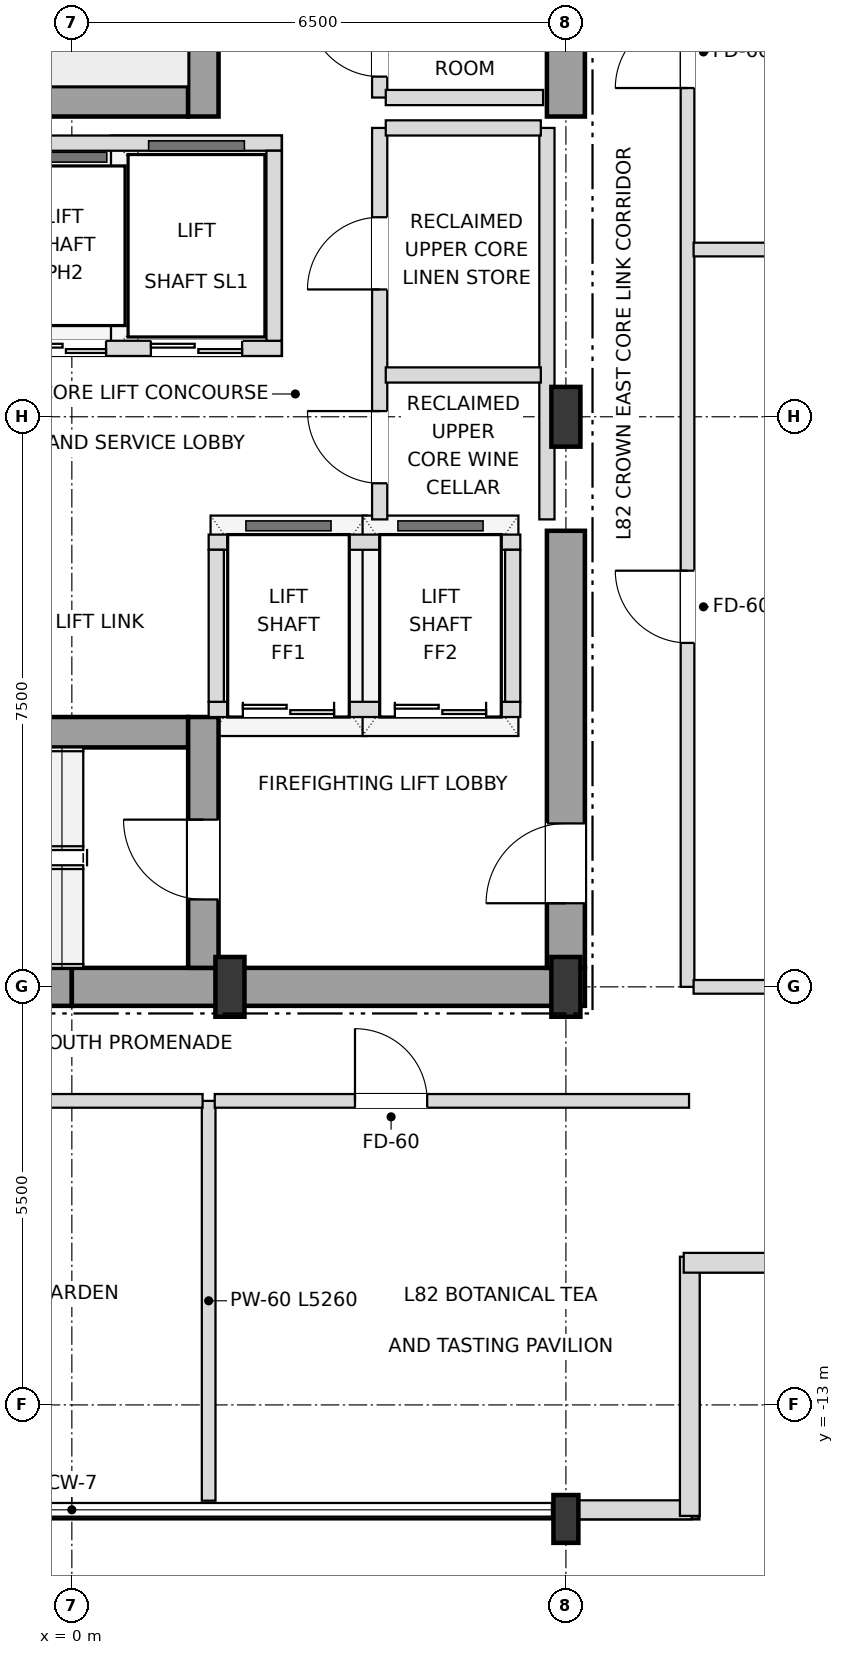
"""IFC4 building model, lengths in metres.
Left out: names, types, materials, properties, quantities, classifications, styles, units other than length and angle.
Written with IfcOpenShell. Run it as: python <this file> out.ifc"""

import sys

from ifc_helpers import new_model, si_unit, direction, frame, frame_2d, origin, origin_2d, place, context, subcontext, project, spatial, rectangle, i_section, extrude, element, fill, save


model = new_model("IFC4")
c1 = context("Model", 3, precision=1e-05, world=origin(), true_north=direction((0.0, 1.0)))
c2 = subcontext(c1, "Body", "Model", "MODEL_VIEW")
j1 = project(units=[si_unit("LENGTHUNIT", "METRE"), si_unit("PLANEANGLEUNIT", "RADIAN")], contexts=[c1])
p1 = place(None, origin())
s1 = spatial("IfcSite", under=j1, at=p1, CompositionType="ELEMENT")
p2 = place(p1, origin())
s2 = spatial("IfcBuilding", under=s1, at=p2, CompositionType="ELEMENT")
p3 = place(p2, frame((0.0, 0.0, 314.4)))
s3 = spatial("IfcBuildingStorey", under=s2, at=p3, CompositionType="ELEMENT", Elevation=314.4)
for number, where, z_axis, x_axis in (
    (1, (2.08, -7.5, 0.0), (0.0, 0.0, 1.0), (1.0, 0.0, 0.0)),
    (2, (6.5, -7.5, 0.0), (0.0, 0.0, 1.0), (1.0, 0.0, 0.0)),
    (3, (6.5, 0.0, 0.0), (0.0, 0.0, 1.0), (1.0, 0.0, 0.0)),
):
    element("IfcColumn", number, at=place(p3, frame(where, z_axis=z_axis, x_axis=x_axis)), inside=s3, PredefinedType="COLUMN", context=c2, shape_type="SweptSolid", body=[
        extrude(i_section(OverallWidth=0.382, OverallDepth=0.786, WebThickness=0.02, FlangeThickness=0.033, at=origin_2d()), origin(), (0.0, 0.0, 1.0), 4.5),
    ])
p4 = place(p3, frame((6.5, -14.5, 0.0), z_axis=(0.0, 0.0, 1.0), x_axis=(1.0, 0.0, 0.0)))
e4 = element("IfcColumn", 4, at=p4, inside=s3, PredefinedType="COLUMN", context=c2, shape_type="SweptSolid", body=[
    extrude(i_section(OverallWidth=0.328, OverallDepth=0.629, WebThickness=0.014, FlangeThickness=0.021, at=origin_2d()), origin(), (0.0, 0.0, 1.0), 4.5),
])
p5 = place(p3, frame((6.659, -14.38, 0.0), z_axis=(0.0, 0.0, 1.0), x_axis=(1.0, 0.0, 0.0)))
e5 = element("IfcWall", 5, at=p5, inside=s3, PredefinedType="SOLIDWALL", context=c2, shape_type="SweptSolid", body=[
    extrude(rectangle(XDim=1.496, YDim=0.25, at=frame_2d((0.748, 0.0))), origin(), (0.0, 0.0, 1.0), 4.25),
])
for number, where, z_axis, x_axis in (
    (6, (8.13, -14.46, 0.0), (0.0, 0.0, 1.0), (0.0, 1.0, 0.0)),
    (7, (8.05, -11.13, 0.0), (0.0, 0.0, 1.0), (1.0, 0.0, 0.0)),
):
    element("IfcWall", number, at=place(p3, frame(where, z_axis=z_axis, x_axis=x_axis)), inside=s3, PredefinedType="SOLIDWALL", context=c2, shape_type="SweptSolid", body=[
        extrude(rectangle(XDim=3.41, YDim=0.26, at=frame_2d((1.705, 0.0))), origin(), (0.0, 0.0, 1.0), 4.25),
    ])
for number, where, z_axis, x_axis in (
    (8, (-6.75, -7.5, 0.0), (0.0, 0.0, 1.0), (1.0, 0.0, 0.0)),
    (9, (0.0, -7.5, 0.0), (0.0, 0.0, 1.0), (1.0, 0.0, 0.0)),
):
    element("IfcWall", number, at=place(p3, frame(where, z_axis=z_axis, x_axis=x_axis)), inside=s3, PredefinedType="SHEAR", context=c2, shape_type="SweptSolid", body=[
        extrude(rectangle(XDim=6.75, YDim=0.5, at=frame_2d((3.375, 0.0))), origin(), (0.0, 0.0, 1.0), 4.25),
    ])
p6 = place(p3, frame((6.5, -7.25, 0.0), z_axis=(0.0, 0.0, 1.0), x_axis=(0.0, 1.0, 0.0)))
e10 = element("IfcWall", 10, at=p6, inside=s3, PredefinedType="SHEAR", context=c2, shape_type="SweptSolid", body=[
    extrude(rectangle(XDim=5.75, YDim=0.5, at=frame_2d((2.875, 0.0))), origin(), (0.0, 0.0, 1.0), 4.25),
])
p7 = place(p6, frame((0.85, 0.0, 0.0)))
e11 = element("IfcOpeningElement", 11, at=p7, cuts=e10, PredefinedType="OPENING", context=c2, shape_type="SweptSolid", body=[
    extrude(rectangle(XDim=1.05, YDim=2.15, at=frame_2d((0.525, 1.075))), frame((0.0, 0.26, 0.0), z_axis=(0.0, -1.0, 0.0), x_axis=(1.0, 0.0, 0.0)), (0.0, 0.0, 1.0), 0.52),
])
p8 = place(p3, frame((6.5, 3.95, 0.0), z_axis=(0.0, 0.0, 1.0), x_axis=(0.0, 1.0, 0.0)))
e12 = element("IfcWall", 12, at=p8, inside=s3, PredefinedType="SHEAR", context=c2, shape_type="SweptSolid", body=[
    extrude(rectangle(XDim=3.3, YDim=0.5, at=frame_2d((1.65, 0.0))), origin(), (0.0, 0.0, 1.0), 4.25),
])
p9 = place(p3, frame((-6.25, -4.15, 0.0), z_axis=(0.0, 0.0, 1.0), x_axis=(1.0, 0.0, 0.0)))
e13 = element("IfcWall", 13, at=p9, inside=s3, PredefinedType="SHEAR", context=c2, shape_type="SweptSolid", body=[
    extrude(rectangle(XDim=7.78, YDim=0.4, at=frame_2d((3.89, 0.0))), origin(), (0.0, 0.0, 1.0), 4.25),
])
p10 = place(p3, frame((1.73, -7.25, 0.0), z_axis=(0.0, 0.0, 1.0), x_axis=(0.0, 1.0, 0.0)))
e14 = element("IfcWall", 14, at=p10, inside=s3, PredefinedType="SHEAR", context=c2, shape_type="SweptSolid", body=[
    extrude(rectangle(XDim=3.3, YDim=0.4, at=frame_2d((1.65, 0.0))), origin(), (0.0, 0.0, 1.0), 4.25),
])
p11 = place(p10, frame((0.9, 0.0, 0.0)))
e15 = element("IfcOpeningElement", 15, at=p11, cuts=e14, PredefinedType="OPENING", context=c2, shape_type="SweptSolid", body=[
    extrude(rectangle(XDim=1.05, YDim=2.15, at=frame_2d((0.525, 1.075))), frame((0.0, 0.21, 0.0), z_axis=(0.0, -1.0, 0.0), x_axis=(1.0, 0.0, 0.0)), (0.0, 0.0, 1.0), 0.42),
])
p12 = place(p3, frame((-5.55, 4.15, 0.0), z_axis=(0.0, 0.0, 1.0), x_axis=(1.0, 0.0, 0.0)))
e16 = element("IfcWall", 16, at=p12, inside=s3, PredefinedType="SHEAR", context=c2, shape_type="SweptSolid", body=[
    extrude(rectangle(XDim=7.08, YDim=0.4, at=frame_2d((3.54, 0.0))), origin(), (0.0, 0.0, 1.0), 4.25),
])
p13 = place(p3, frame((1.73, 3.95, 0.0), z_axis=(0.0, 0.0, 1.0), x_axis=(0.0, 1.0, 0.0)))
e17 = element("IfcWall", 17, at=p13, inside=s3, PredefinedType="SHEAR", context=c2, shape_type="SweptSolid", body=[
    extrude(rectangle(XDim=3.3, YDim=0.4, at=frame_2d((1.65, 0.0))), origin(), (0.0, 0.0, 1.0), 4.25),
])
p14 = place(p3, frame((-2.82, 0.9, 0.0), z_axis=(0.0, 0.0, 1.0), x_axis=(1.0, 0.0, 0.0)))
e18 = element("IfcWall", 18, at=p14, inside=s3, PredefinedType="SOLIDWALL", context=c2, shape_type="SweptSolid", body=[
    extrude(rectangle(XDim=5.58, YDim=0.2, at=frame_2d((2.79, 0.0))), origin(), (0.0, 0.0, 1.0), 4.25),
])
p15 = place(p14, frame((0.49, 0.0, 0.0)))
e19 = element("IfcOpeningElement", 19, at=p15, cuts=e18, PredefinedType="OPENING", context=c2, shape_type="SweptSolid", body=[
    extrude(rectangle(XDim=1.1, YDim=2.15, at=frame_2d((0.55, 1.075))), frame((0.0, 0.11, 0.0), z_axis=(0.0, -1.0, 0.0), x_axis=(1.0, 0.0, 0.0)), (0.0, 0.0, 1.0), 0.22),
])
p16 = place(p14, frame((2.17, 0.0, 0.0)))
e20 = element("IfcOpeningElement", 20, at=p16, cuts=e18, PredefinedType="OPENING", context=c2, shape_type="SweptSolid", body=[
    extrude(rectangle(XDim=1.1, YDim=2.15, at=frame_2d((0.55, 1.075))), frame((0.0, 0.11, 0.0), z_axis=(0.0, -1.0, 0.0), x_axis=(1.0, 0.0, 0.0)), (0.0, 0.0, 1.0), 0.22),
])
p17 = place(p14, frame((3.86, 0.0, 0.0)))
e21 = element("IfcOpeningElement", 21, at=p17, cuts=e18, PredefinedType="OPENING", context=c2, shape_type="SweptSolid", body=[
    extrude(rectangle(XDim=1.2, YDim=2.2, at=frame_2d((0.6, 1.1))), frame((0.0, 0.11, 0.0), z_axis=(0.0, -1.0, 0.0), x_axis=(1.0, 0.0, 0.0)), (0.0, 0.0, 1.0), 0.22),
])
p18 = place(p3, frame((-2.82, 3.6, 0.0), z_axis=(0.0, 0.0, 1.0), x_axis=(1.0, 0.0, 0.0)))
e22 = element("IfcWall", 22, at=p18, inside=s3, PredefinedType="SOLIDWALL", context=c2, shape_type="SweptSolid", body=[
    extrude(rectangle(XDim=5.58, YDim=0.2, at=frame_2d((2.79, 0.0))), origin(), (0.0, 0.0, 1.0), 4.25),
])
p19 = place(p3, frame((2.66, 1.0, 0.0), z_axis=(0.0, 0.0, 1.0), x_axis=(0.0, 1.0, 0.0)))
e23 = element("IfcWall", 23, at=p19, inside=s3, PredefinedType="SOLIDWALL", context=c2, shape_type="SweptSolid", body=[
    extrude(rectangle(XDim=2.5, YDim=0.2, at=frame_2d((1.25, 0.0))), origin(), (0.0, 0.0, 1.0), 4.25),
])
p20 = place(p3, frame((1.8, -3.85, 0.0), z_axis=(0.0, 0.0, 1.0), x_axis=(1.0, 0.0, 0.0)))
e24 = element("IfcWall", 24, at=p20, inside=s3, PredefinedType="SOLIDWALL", context=c2, shape_type="SweptSolid", body=[
    extrude(rectangle(XDim=4.1, YDim=0.2, at=frame_2d((2.05, 0.0))), origin(), (0.0, 0.0, 1.0), 4.25),
])
p21 = place(p20, frame((0.45, 0.0, 0.0)))
e25 = element("IfcOpeningElement", 25, at=p21, cuts=e24, PredefinedType="OPENING", context=c2, shape_type="SweptSolid", body=[
    extrude(rectangle(XDim=1.2, YDim=2.2, at=frame_2d((0.6, 1.1))), frame((0.0, 0.11, 0.0), z_axis=(0.0, -1.0, 0.0), x_axis=(1.0, 0.0, 0.0)), (0.0, 0.0, 1.0), 0.22),
])
p22 = place(p20, frame((2.45, 0.0, 0.0)))
e26 = element("IfcOpeningElement", 26, at=p22, cuts=e24, PredefinedType="OPENING", context=c2, shape_type="SweptSolid", body=[
    extrude(rectangle(XDim=1.2, YDim=2.2, at=frame_2d((0.6, 1.1))), frame((0.0, 0.11, 0.0), z_axis=(0.0, -1.0, 0.0), x_axis=(1.0, 0.0, 0.0)), (0.0, 0.0, 1.0), 0.22),
])
p23 = place(p3, frame((1.8, -1.65, 0.0), z_axis=(0.0, 0.0, 1.0), x_axis=(1.0, 0.0, 0.0)))
e27 = element("IfcWall", 27, at=p23, inside=s3, PredefinedType="SOLIDWALL", context=c2, shape_type="SweptSolid", body=[
    extrude(rectangle(XDim=4.1, YDim=0.2, at=frame_2d((2.05, 0.0))), origin(), (0.0, 0.0, 1.0), 4.25),
])
for number, where, z_axis, x_axis in (
    (28, (1.9, -3.75, 0.0), (0.0, 0.0, 1.0), (0.0, 1.0, 0.0)),
    (29, (5.8, -3.75, 0.0), (0.0, 0.0, 1.0), (0.0, 1.0, 0.0)),
):
    element("IfcWall", number, at=place(p3, frame(where, z_axis=z_axis, x_axis=x_axis)), inside=s3, PredefinedType="SOLIDWALL", context=c2, shape_type="SweptSolid", body=[
        extrude(rectangle(XDim=2.0, YDim=0.2, at=frame_2d((1.0, 0.0))), origin(), (0.0, 0.0, 1.0), 4.25),
    ])
p24 = place(p3, frame((1.8, -14.26, 0.0), z_axis=(0.0, 0.0, 1.0), x_axis=(0.0, 1.0, 0.0)))
e30 = element("IfcWall", 30, at=p24, inside=s3, PredefinedType="PARTITIONING", context=c2, shape_type="SweptSolid", body=[
    extrude(rectangle(XDim=5.26, YDim=0.18, at=frame_2d((2.63, 0.0))), origin(), (0.0, 0.0, 1.0), 4.25),
])
p25 = place(p3, frame((4.05, -1.35, 0.0), z_axis=(0.0, 0.0, 1.0), x_axis=(0.0, 1.0, 0.0)))
e31 = element("IfcWall", 31, at=p25, inside=s3, PredefinedType="SOLIDWALL", context=c2, shape_type="SweptSolid", body=[
    extrude(rectangle(XDim=5.15, YDim=0.2, at=frame_2d((2.575, 0.0))), origin(), (0.0, 0.0, 1.0), 4.25),
])
p26 = place(p25, frame((0.475, 0.0, 0.0)))
e32 = element("IfcOpeningElement", 32, at=p26, cuts=e31, PredefinedType="OPENING", context=c2, shape_type="SweptSolid", body=[
    extrude(rectangle(XDim=0.95, YDim=2.15, at=frame_2d((0.475, 1.075))), frame((0.0, 0.11, 0.0), z_axis=(0.0, -1.0, 0.0), x_axis=(1.0, 0.0, 0.0)), (0.0, 0.0, 1.0), 0.22),
])
p27 = place(p25, frame((3.025, 0.0, 0.0)))
e33 = element("IfcOpeningElement", 33, at=p27, cuts=e31, PredefinedType="OPENING", context=c2, shape_type="SweptSolid", body=[
    extrude(rectangle(XDim=0.95, YDim=2.15, at=frame_2d((0.475, 1.075))), frame((0.0, 0.11, 0.0), z_axis=(0.0, -1.0, 0.0), x_axis=(1.0, 0.0, 0.0)), (0.0, 0.0, 1.0), 0.22),
])
p28 = place(p3, frame((4.05, 4.2, 0.0), z_axis=(0.0, 0.0, 1.0), x_axis=(0.0, 1.0, 0.0)))
e34 = element("IfcWall", 34, at=p28, inside=s3, PredefinedType="SOLIDWALL", context=c2, shape_type="SweptSolid", body=[
    extrude(rectangle(XDim=3.05, YDim=0.2, at=frame_2d((1.525, 0.0))), origin(), (0.0, 0.0, 1.0), 4.25),
])
p29 = place(p28, frame((0.275, 0.0, 0.0)))
e35 = element("IfcOpeningElement", 35, at=p29, cuts=e34, PredefinedType="OPENING", context=c2, shape_type="SweptSolid", body=[
    extrude(rectangle(XDim=0.95, YDim=2.15, at=frame_2d((0.475, 1.075))), frame((0.0, 0.11, 0.0), z_axis=(0.0, -1.0, 0.0), x_axis=(1.0, 0.0, 0.0)), (0.0, 0.0, 1.0), 0.22),
])
p30 = place(p28, frame((1.775, 0.0, 0.0)))
e36 = element("IfcOpeningElement", 36, at=p30, cuts=e34, PredefinedType="OPENING", context=c2, shape_type="SweptSolid", body=[
    extrude(rectangle(XDim=0.95, YDim=2.15, at=frame_2d((0.475, 1.075))), frame((0.0, 0.11, 0.0), z_axis=(0.0, -1.0, 0.0), x_axis=(1.0, 0.0, 0.0)), (0.0, 0.0, 1.0), 0.22),
])
p31 = place(p3, frame((6.25, -1.35, 0.0), z_axis=(0.0, 0.0, 1.0), x_axis=(0.0, 1.0, 0.0)))
e37 = element("IfcWall", 37, at=p31, inside=s3, PredefinedType="SOLIDWALL", context=c2, shape_type="SweptSolid", body=[
    extrude(rectangle(XDim=5.15, YDim=0.2, at=frame_2d((2.575, 0.0))), origin(), (0.0, 0.0, 1.0), 4.25),
])
p32 = place(p3, frame((8.1, -7.5, 0.0), z_axis=(0.0, 0.0, 1.0), x_axis=(0.0, 1.0, 0.0)))
e38 = element("IfcWall", 38, at=p32, inside=s3, PredefinedType="PARTITIONING", context=c2, shape_type="SweptSolid", body=[
    extrude(rectangle(XDim=15.0, YDim=0.18, at=frame_2d((7.5, 0.0))), origin(), (0.0, 0.0, 1.0), 4.25),
])
p33 = place(p32, frame((4.525, 0.0, 0.0)))
e39 = element("IfcOpeningElement", 39, at=p33, cuts=e38, PredefinedType="OPENING", context=c2, shape_type="SweptSolid", body=[
    extrude(rectangle(XDim=0.95, YDim=2.15, at=frame_2d((0.475, 1.075))), frame((0.0, 0.1, 0.0), z_axis=(0.0, -1.0, 0.0), x_axis=(1.0, 0.0, 0.0)), (0.0, 0.0, 1.0), 0.2),
])
p34 = place(p32, frame((11.825, 0.0, 0.0)))
e40 = element("IfcOpeningElement", 40, at=p34, cuts=e38, PredefinedType="OPENING", context=c2, shape_type="SweptSolid", body=[
    extrude(rectangle(XDim=0.95, YDim=2.15, at=frame_2d((0.475, 1.075))), frame((0.0, 0.1, 0.0), z_axis=(0.0, -1.0, 0.0), x_axis=(1.0, 0.0, 0.0)), (0.0, 0.0, 1.0), 0.2),
])
p35 = place(p3, frame((-8.12, -9.0, 0.0), z_axis=(0.0, 0.0, 1.0), x_axis=(1.0, 0.0, 0.0)))
e41 = element("IfcWall", 41, at=p35, inside=s3, PredefinedType="PARTITIONING", context=c2, shape_type="SweptSolid", body=[
    extrude(rectangle(XDim=9.84, YDim=0.18, at=frame_2d((4.92, 0.0))), origin(), (0.0, 0.0, 1.0), 4.25),
])
p36 = place(p35, frame((3.445, 0.0, 0.0)))
e42 = element("IfcOpeningElement", 42, at=p36, cuts=e41, PredefinedType="OPENING", context=c2, shape_type="SweptSolid", body=[
    extrude(rectangle(XDim=0.95, YDim=2.15, at=frame_2d((0.475, 1.075))), frame((0.0, 0.1, 0.0), z_axis=(0.0, -1.0, 0.0), x_axis=(1.0, 0.0, 0.0)), (0.0, 0.0, 1.0), 0.2),
])
p37 = place(p3, frame((1.88, -9.0, 0.0), z_axis=(0.0, 0.0, 1.0), x_axis=(1.0, 0.0, 0.0)))
e43 = element("IfcWall", 43, at=p37, inside=s3, PredefinedType="PARTITIONING", context=c2, shape_type="SweptSolid", body=[
    extrude(rectangle(XDim=6.24, YDim=0.18, at=frame_2d((3.12, 0.0))), origin(), (0.0, 0.0, 1.0), 4.25),
])
p38 = place(p37, frame((1.845, 0.0, 0.0)))
e44 = element("IfcOpeningElement", 44, at=p38, cuts=e43, PredefinedType="OPENING", context=c2, shape_type="SweptSolid", body=[
    extrude(rectangle(XDim=0.95, YDim=2.15, at=frame_2d((0.475, 1.075))), frame((0.0, 0.1, 0.0), z_axis=(0.0, -1.0, 0.0), x_axis=(1.0, 0.0, 0.0)), (0.0, 0.0, 1.0), 0.2),
])
p39 = place(p3, frame((8.18, -7.5, 0.0), z_axis=(0.0, 0.0, 1.0), x_axis=(1.0, 0.0, 0.0)))
e45 = element("IfcWall", 45, at=p39, inside=s3, PredefinedType="PARTITIONING", context=c2, shape_type="SweptSolid", body=[
    extrude(rectangle(XDim=3.065, YDim=0.18, at=frame_2d((1.533, 0.0))), origin(), (0.0, 0.0, 1.0), 3.918),
])
p40 = place(p3, frame((4.13, 0.55, 0.0), z_axis=(0.0, 0.0, 1.0), x_axis=(1.0, 0.0, 0.0)))
e46 = element("IfcWall", 46, at=p40, inside=s3, PredefinedType="SOLIDWALL", context=c2, shape_type="SweptSolid", body=[
    extrude(rectangle(XDim=2.04, YDim=0.2, at=frame_2d((1.02, 0.0))), origin(), (0.0, 0.0, 1.0), 4.25),
])
p41 = place(p3, frame((8.18, 2.2, 0.0), z_axis=(0.0, 0.0, 1.0), x_axis=(1.0, 0.0, 0.0)))
e47 = element("IfcWall", 47, at=p41, inside=s3, PredefinedType="PARTITIONING", context=c2, shape_type="SweptSolid", body=[
    extrude(rectangle(XDim=3.065, YDim=0.18, at=frame_2d((1.533, 0.0))), origin(), (0.0, 0.0, 1.0), 4.25),
])
p42 = place(p3, frame((4.13, 3.8, 0.0), z_axis=(0.0, 0.0, 1.0), x_axis=(1.0, 0.0, 0.0)))
e48 = element("IfcWall", 48, at=p42, inside=s3, PredefinedType="SOLIDWALL", context=c2, shape_type="SweptSolid", body=[
    extrude(rectangle(XDim=2.04, YDim=0.2, at=frame_2d((1.02, 0.0))), origin(), (0.0, 0.0, 1.0), 4.25),
])
p43 = place(p3, frame((4.13, 4.2, 0.0), z_axis=(0.0, 0.0, 1.0), x_axis=(1.0, 0.0, 0.0)))
e49 = element("IfcWall", 49, at=p43, inside=s3, PredefinedType="SOLIDWALL", context=c2, shape_type="SweptSolid", body=[
    extrude(rectangle(XDim=2.07, YDim=0.2, at=frame_2d((1.035, 0.0))), origin(), (0.0, 0.0, 1.0), 4.25),
])
p44 = place(p7, origin())
e50 = element("IfcDoor", 50, at=p44, inside=s3, OperationType="SINGLE_SWING_LEFT", PredefinedType="DOOR", context=c2, shape_type="SweptSolid", body=[
    extrude(rectangle(XDim=1.05, YDim=2.15, at=frame_2d((0.525, 1.075))), frame((0.0, 0.025, 0.0), z_axis=(0.0, -1.0, 0.0), x_axis=(1.0, 0.0, 0.0)), (0.0, 0.0, 1.0), 0.05),
])
fill(e11, e50)
p45 = place(p11, origin())
e51 = element("IfcDoor", 51, at=p45, inside=s3, OperationType="SINGLE_SWING_RIGHT", PredefinedType="DOOR", context=c2, shape_type="SweptSolid", body=[
    extrude(rectangle(XDim=1.05, YDim=2.15, at=frame_2d((0.525, 1.075))), frame((0.0, 0.025, 0.0), z_axis=(0.0, -1.0, 0.0), x_axis=(1.0, 0.0, 0.0)), (0.0, 0.0, 1.0), 0.05),
])
fill(e15, e51)
p46 = place(p16, origin())
e52 = element("IfcDoor", 52, at=p46, inside=s3, OperationType="DOUBLE_DOOR_SLIDING", PredefinedType="DOOR", context=c2, shape_type="SweptSolid", body=[
    extrude(rectangle(XDim=1.1, YDim=2.15, at=frame_2d((0.55, 1.075))), frame((0.0, 0.025, 0.0), z_axis=(0.0, -1.0, 0.0), x_axis=(1.0, 0.0, 0.0)), (0.0, 0.0, 1.0), 0.05),
])
fill(e20, e52)
p47 = place(p17, origin())
e53 = element("IfcDoor", 53, at=p47, inside=s3, OperationType="DOUBLE_DOOR_SLIDING", PredefinedType="DOOR", context=c2, shape_type="SweptSolid", body=[
    extrude(rectangle(XDim=1.2, YDim=2.2, at=frame_2d((0.6, 1.1))), frame((0.0, 0.025, 0.0), z_axis=(0.0, -1.0, 0.0), x_axis=(1.0, 0.0, 0.0)), (0.0, 0.0, 1.0), 0.05),
])
fill(e21, e53)
p48 = place(p21, origin())
e54 = element("IfcDoor", 54, at=p48, inside=s3, OperationType="DOUBLE_DOOR_SLIDING", PredefinedType="DOOR", context=c2, shape_type="SweptSolid", body=[
    extrude(rectangle(XDim=1.2, YDim=2.2, at=frame_2d((0.6, 1.1))), frame((0.0, 0.025, 0.0), z_axis=(0.0, -1.0, 0.0), x_axis=(1.0, 0.0, 0.0)), (0.0, 0.0, 1.0), 0.05),
])
fill(e25, e54)
p49 = place(p22, origin())
e55 = element("IfcDoor", 55, at=p49, inside=s3, OperationType="DOUBLE_DOOR_SLIDING", PredefinedType="DOOR", context=c2, shape_type="SweptSolid", body=[
    extrude(rectangle(XDim=1.2, YDim=2.2, at=frame_2d((0.6, 1.1))), frame((0.0, 0.025, 0.0), z_axis=(0.0, -1.0, 0.0), x_axis=(1.0, 0.0, 0.0)), (0.0, 0.0, 1.0), 0.05),
])
fill(e26, e55)
p50 = place(p26, origin())
e56 = element("IfcDoor", 56, at=p50, inside=s3, OperationType="SINGLE_SWING_RIGHT", PredefinedType="DOOR", context=c2, shape_type="SweptSolid", body=[
    extrude(rectangle(XDim=0.95, YDim=2.15, at=frame_2d((0.475, 1.075))), frame((0.0, 0.025, 0.0), z_axis=(0.0, -1.0, 0.0), x_axis=(1.0, 0.0, 0.0)), (0.0, 0.0, 1.0), 0.05),
])
fill(e32, e56)
p51 = place(p27, origin())
e57 = element("IfcDoor", 57, at=p51, inside=s3, OperationType="SINGLE_SWING_LEFT", PredefinedType="DOOR", context=c2, shape_type="SweptSolid", body=[
    extrude(rectangle(XDim=0.95, YDim=2.15, at=frame_2d((0.475, 1.075))), frame((0.0, 0.025, 0.0), z_axis=(0.0, -1.0, 0.0), x_axis=(1.0, 0.0, 0.0)), (0.0, 0.0, 1.0), 0.05),
])
fill(e33, e57)
p52 = place(p29, origin())
e58 = element("IfcDoor", 58, at=p52, inside=s3, OperationType="SINGLE_SWING_RIGHT", PredefinedType="DOOR", context=c2, shape_type="SweptSolid", body=[
    extrude(rectangle(XDim=0.95, YDim=2.15, at=frame_2d((0.475, 1.075))), frame((0.0, 0.025, 0.0), z_axis=(0.0, -1.0, 0.0), x_axis=(1.0, 0.0, 0.0)), (0.0, 0.0, 1.0), 0.05),
])
fill(e35, e58)
p53 = place(p38, origin())
e59 = element("IfcDoor", 59, at=p53, inside=s3, OperationType="SINGLE_SWING_LEFT", PredefinedType="DOOR", context=c2, shape_type="SweptSolid", body=[
    extrude(rectangle(XDim=0.95, YDim=2.15, at=frame_2d((0.475, 1.075))), frame((0.0, 0.025, 0.0), z_axis=(0.0, -1.0, 0.0), x_axis=(1.0, 0.0, 0.0)), (0.0, 0.0, 1.0), 0.05),
])
fill(e44, e59)
p54 = place(p33, origin())
e60 = element("IfcDoor", 60, at=p54, inside=s3, OperationType="SINGLE_SWING_RIGHT", PredefinedType="DOOR", context=c2, shape_type="SweptSolid", body=[
    extrude(rectangle(XDim=0.95, YDim=2.15, at=frame_2d((0.475, 1.075))), frame((0.0, 0.025, 0.0), z_axis=(0.0, -1.0, 0.0), x_axis=(1.0, 0.0, 0.0)), (0.0, 0.0, 1.0), 0.05),
])
fill(e39, e60)
p55 = place(p34, origin())
e61 = element("IfcDoor", 61, at=p55, inside=s3, OperationType="SINGLE_SWING_LEFT", PredefinedType="DOOR", context=c2, shape_type="SweptSolid", body=[
    extrude(rectangle(XDim=0.95, YDim=2.15, at=frame_2d((0.475, 1.075))), frame((0.0, 0.025, 0.0), z_axis=(0.0, -1.0, 0.0), x_axis=(1.0, 0.0, 0.0)), (0.0, 0.0, 1.0), 0.05),
])
fill(e40, e61)
save(model, sys.argv[1])
